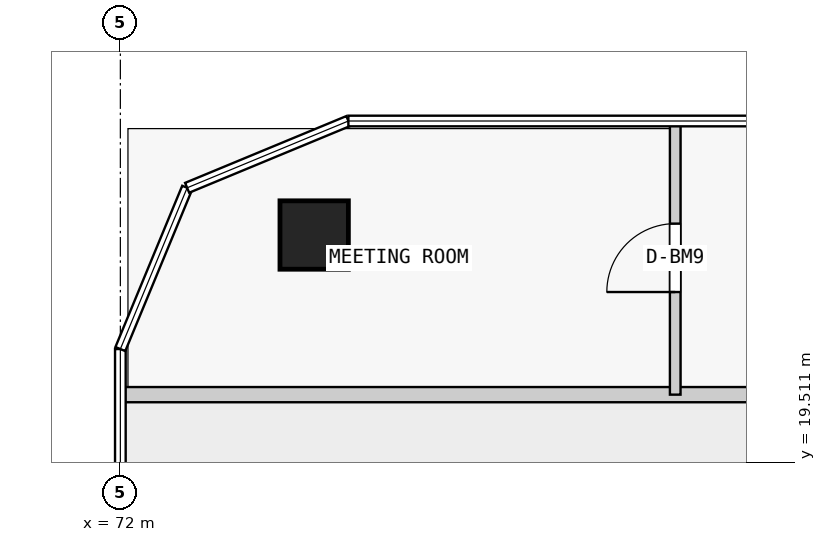
"""IFC4 building model, lengths in metres.
Left out: names, types, materials, properties, quantities, classifications, styles, units other than length and angle.
Written with IfcOpenShell. Run it as: python <this file> out.ifc"""

import sys

from ifc_helpers import new_model, si_unit, direction, frame, frame_2d, origin, origin_2d, place, context, subcontext, project, spatial, rectangle, extrude, element, fill, save


model = new_model("IFC4")
c1 = context("Model", 3, precision=1e-05, world=origin(), true_north=direction((0.0, 1.0)))
c2 = subcontext(c1, "Body", "Model", "MODEL_VIEW")
j1 = project(units=[si_unit("LENGTHUNIT", "METRE"), si_unit("PLANEANGLEUNIT", "RADIAN")], contexts=[c1])
p1 = place(None, origin())
s1 = spatial("IfcSite", under=j1, at=p1, CompositionType="ELEMENT")
p2 = place(p1, origin())
s2 = spatial("IfcBuilding", under=s1, at=p2, CompositionType="ELEMENT")
p3 = place(p2, frame((0.0, 0.0, 65.3)))
s3 = spatial("IfcBuildingStorey", under=s2, at=p3, CompositionType="ELEMENT", Elevation=65.3)
p4 = place(p3, frame((74.55, 22.5, 0.0), z_axis=(0.0, 0.0, 1.0), x_axis=(1.0, 0.0, 0.0)))
e1 = element("IfcColumn", 1, at=p4, inside=s3, PredefinedType="COLUMN", context=c2, shape_type="SweptSolid", body=[
    extrude(rectangle(XDim=0.9, YDim=0.9, at=origin_2d()), origin(), (0.0, 0.0, 1.0), 3.5),
])
p5 = place(p3, frame((72.0, 20.4, 0.0), z_axis=(0.0, 0.0, 1.0), x_axis=(1.0, 0.0, 0.0)))
e2 = element("IfcWall", 2, at=p5, inside=s3, PredefinedType="PARTITIONING", context=c2, shape_type="SweptSolid", body=[
    extrude(rectangle(XDim=20.0, YDim=0.2, at=frame_2d((10.0, 0.0))), origin(), (0.0, 0.0, 1.0), 3.25),
])
p6 = place(p3, frame((79.3, 20.4, 0.0), z_axis=(0.0, 0.0, 1.0), x_axis=(0.0, 1.0, 0.0)))
e3 = element("IfcWall", 3, at=p6, inside=s3, PredefinedType="PARTITIONING", context=c2, shape_type="SweptSolid", body=[
    extrude(rectangle(XDim=3.6, YDim=0.14, at=frame_2d((1.8, 0.0))), origin(), (0.0, 0.0, 1.0), 3.25),
])
p7 = place(p6, frame((1.35, 0.0, 0.0)))
e4 = element("IfcOpeningElement", 4, at=p7, cuts=e3, PredefinedType="OPENING", context=c2, shape_type="SweptSolid", body=[
    extrude(rectangle(XDim=0.9, YDim=2.4, at=frame_2d((0.45, 1.2))), frame((0.0, 0.08, 0.0), z_axis=(0.0, -1.0, 0.0), x_axis=(1.0, 0.0, 0.0)), (0.0, 0.0, 1.0), 0.16),
])
p8 = place(p7, origin())
e5 = element("IfcDoor", 5, at=p8, inside=s3, OperationType="SINGLE_SWING_LEFT", PredefinedType="DOOR", context=c2, shape_type="SweptSolid", body=[
    extrude(rectangle(XDim=0.9, YDim=2.4, at=frame_2d((0.45, 1.2))), frame((0.0, 0.025, 0.0), z_axis=(0.0, -1.0, 0.0), x_axis=(1.0, 0.0, 0.0)), (0.0, 0.0, 1.0), 0.05),
])
fill(e4, e5)
save(model, sys.argv[1])
